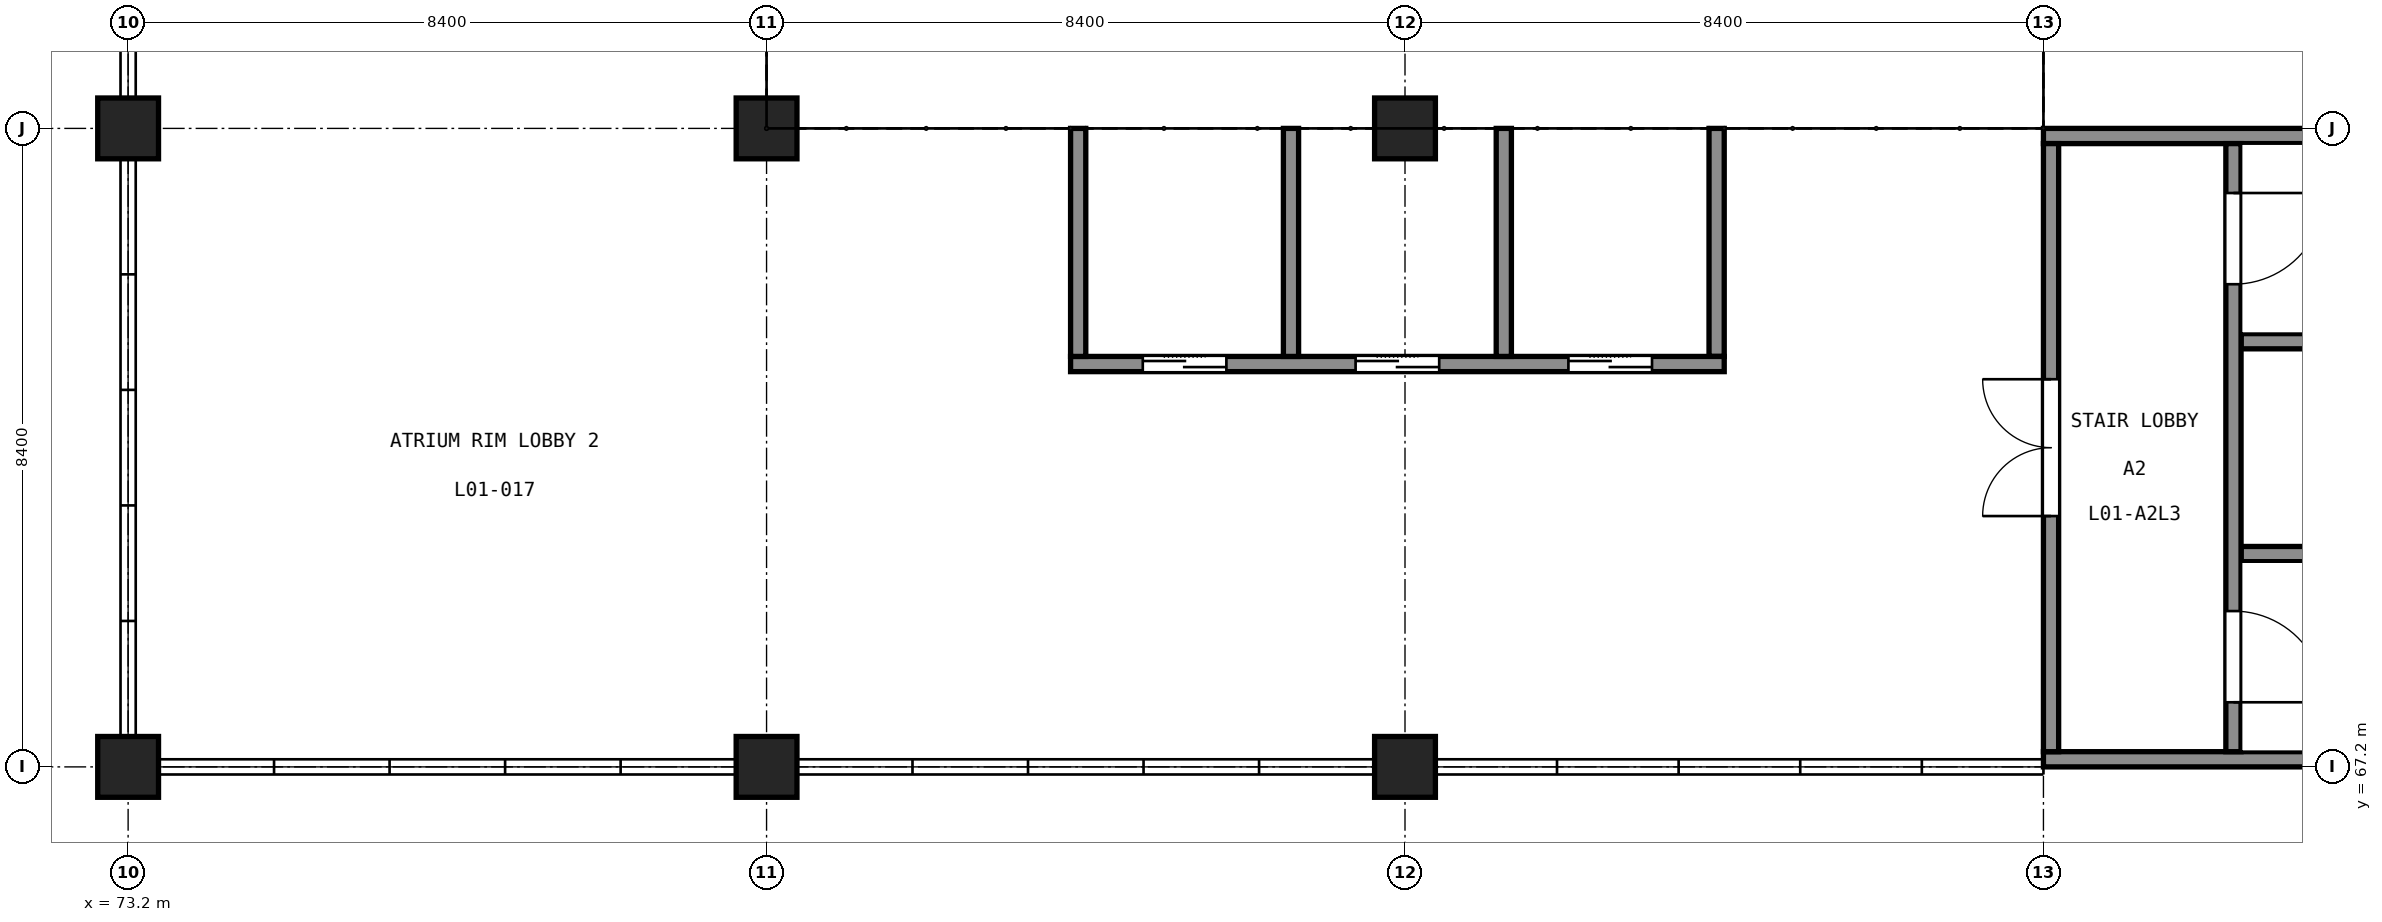
"""IFC4 building model, lengths in metres.
Left out: names, types, materials, properties, quantities, classifications, styles, units other than length and angle.
Written with IfcOpenShell. Run it as: python <this file> out.ifc"""

import sys

from ifc_helpers import new_model, si_unit, direction, frame, frame_2d, origin, origin_2d, place, context, subcontext, project, spatial, rectangle, extrude, element, fill, save


model = new_model("IFC4")
c1 = context("Model", 3, precision=1e-05, world=origin(), true_north=direction((0.0, 1.0)))
c2 = subcontext(c1, "Body", "Model", "MODEL_VIEW")
j1 = project(units=[si_unit("LENGTHUNIT", "METRE"), si_unit("PLANEANGLEUNIT", "RADIAN")], contexts=[c1])
p1 = place(None, origin())
s1 = spatial("IfcSite", under=j1, at=p1, CompositionType="ELEMENT")
p2 = place(p1, origin())
s2 = spatial("IfcBuilding", under=s1, at=p2, CompositionType="ELEMENT")
p3 = place(p2, frame((0.0, 0.0, 5.5)))
s3 = spatial("IfcBuildingStorey", under=s2, at=p3, CompositionType="ELEMENT", Elevation=5.5)
for number, where, z_axis, x_axis in (
    (1, (98.4, 67.3, 0.0), (0.0, 0.0, 1.0), (1.0, 0.0, 0.0)),
    (2, (98.4, 75.5, 0.0), (0.0, 0.0, 1.0), (1.0, 0.0, 0.0)),
):
    element("IfcWall", number, at=place(p3, frame(where, z_axis=z_axis, x_axis=x_axis)), inside=s3, PredefinedType="SHEAR", context=c2, shape_type="SweptSolid", body=[
        extrude(rectangle(XDim=8.4, YDim=0.2, at=frame_2d((4.2, 0.0))), origin(), (0.0, 0.0, 1.0), 5.0),
    ])
p4 = place(p3, frame((98.5, 67.4, 0.0), z_axis=(0.0, 0.0, 1.0), x_axis=(0.0, 1.0, 0.0)))
e3 = element("IfcWall", 3, at=p4, inside=s3, PredefinedType="SHEAR", context=c2, shape_type="SweptSolid", body=[
    extrude(rectangle(XDim=8.0, YDim=0.2, at=frame_2d((4.0, 0.0))), origin(), (0.0, 0.0, 1.0), 5.0),
])
p5 = place(p4, frame((3.1, 0.0, 0.0)))
e4 = element("IfcOpeningElement", 4, at=p5, cuts=e3, PredefinedType="OPENING", context=c2, shape_type="SweptSolid", body=[
    extrude(rectangle(XDim=1.8, YDim=2.1, at=frame_2d((0.9, 1.05))), frame((0.0, 0.11, 0.0), z_axis=(0.0, -1.0, 0.0), x_axis=(1.0, 0.0, 0.0)), (0.0, 0.0, 1.0), 0.22),
])
p6 = place(p3, frame((100.9, 67.4, 0.0), z_axis=(0.0, 0.0, 1.0), x_axis=(0.0, 1.0, 0.0)))
e5 = element("IfcWall", 5, at=p6, inside=s3, PredefinedType="SHEAR", context=c2, shape_type="SweptSolid", body=[
    extrude(rectangle(XDim=8.0, YDim=0.2, at=frame_2d((4.0, 0.0))), origin(), (0.0, 0.0, 1.0), 5.0),
])
p7 = place(p6, frame((0.65, 0.0, 0.0)))
e6 = element("IfcOpeningElement", 6, at=p7, cuts=e5, PredefinedType="OPENING", context=c2, shape_type="SweptSolid", body=[
    extrude(rectangle(XDim=1.2, YDim=2.1, at=frame_2d((0.6, 1.05))), frame((0.0, 0.11, 0.0), z_axis=(0.0, -1.0, 0.0), x_axis=(1.0, 0.0, 0.0)), (0.0, 0.0, 1.0), 0.22),
])
p8 = place(p6, frame((6.15, 0.0, 0.0)))
e7 = element("IfcOpeningElement", 7, at=p8, cuts=e5, PredefinedType="OPENING", context=c2, shape_type="SweptSolid", body=[
    extrude(rectangle(XDim=1.2, YDim=2.1, at=frame_2d((0.6, 1.05))), frame((0.0, 0.11, 0.0), z_axis=(0.0, -1.0, 0.0), x_axis=(1.0, 0.0, 0.0)), (0.0, 0.0, 1.0), 0.22),
])
for number, where, z_axis, x_axis in (
    (8, (101.0, 70.0, 0.0), (0.0, 0.0, 1.0), (1.0, 0.0, 0.0)),
    (9, (101.0, 72.8, 0.0), (0.0, 0.0, 1.0), (1.0, 0.0, 0.0)),
):
    element("IfcWall", number, at=place(p3, frame(where, z_axis=z_axis, x_axis=x_axis)), inside=s3, PredefinedType="SHEAR", context=c2, shape_type="SweptSolid", body=[
        extrude(rectangle(XDim=5.6, YDim=0.2, at=frame_2d((2.8, 0.0))), origin(), (0.0, 0.0, 1.0), 5.0),
    ])
p9 = place(p3, frame((85.6, 72.5, 0.0), z_axis=(0.0, 0.0, 1.0), x_axis=(1.0, 0.0, 0.0)))
e10 = element("IfcWall", 10, at=p9, inside=s3, PredefinedType="SHEAR", context=c2, shape_type="SweptSolid", body=[
    extrude(rectangle(XDim=8.6, YDim=0.2, at=frame_2d((4.3, 0.0))), origin(), (0.0, 0.0, 1.0), 5.0),
])
p10 = place(p9, frame((0.95, 0.0, 0.0)))
e11 = element("IfcOpeningElement", 11, at=p10, cuts=e10, PredefinedType="OPENING", context=c2, shape_type="SweptSolid", body=[
    extrude(rectangle(XDim=1.1, YDim=2.1, at=frame_2d((0.55, 1.05))), frame((0.0, 0.11, 0.0), z_axis=(0.0, -1.0, 0.0), x_axis=(1.0, 0.0, 0.0)), (0.0, 0.0, 1.0), 0.22),
])
p11 = place(p9, frame((3.75, 0.0, 0.0)))
e12 = element("IfcOpeningElement", 12, at=p11, cuts=e10, PredefinedType="OPENING", context=c2, shape_type="SweptSolid", body=[
    extrude(rectangle(XDim=1.1, YDim=2.1, at=frame_2d((0.55, 1.05))), frame((0.0, 0.11, 0.0), z_axis=(0.0, -1.0, 0.0), x_axis=(1.0, 0.0, 0.0)), (0.0, 0.0, 1.0), 0.22),
])
p12 = place(p9, frame((6.55, 0.0, 0.0)))
e13 = element("IfcOpeningElement", 13, at=p12, cuts=e10, PredefinedType="OPENING", context=c2, shape_type="SweptSolid", body=[
    extrude(rectangle(XDim=1.1, YDim=2.1, at=frame_2d((0.55, 1.05))), frame((0.0, 0.11, 0.0), z_axis=(0.0, -1.0, 0.0), x_axis=(1.0, 0.0, 0.0)), (0.0, 0.0, 1.0), 0.22),
])
for number, where, z_axis, x_axis in (
    (14, (85.7, 72.6, 0.0), (0.0, 0.0, 1.0), (0.0, 1.0, 0.0)),
    (15, (94.1, 72.6, 0.0), (0.0, 0.0, 1.0), (0.0, 1.0, 0.0)),
    (16, (88.5, 72.6, 0.0), (0.0, 0.0, 1.0), (0.0, 1.0, 0.0)),
    (17, (91.3, 72.6, 0.0), (0.0, 0.0, 1.0), (0.0, 1.0, 0.0)),
):
    element("IfcWall", number, at=place(p3, frame(where, z_axis=z_axis, x_axis=x_axis)), inside=s3, PredefinedType="SHEAR", context=c2, shape_type="SweptSolid", body=[
        extrude(rectangle(XDim=3.0, YDim=0.2, at=frame_2d((1.5, 0.0))), origin(), (0.0, 0.0, 1.0), 5.0),
    ])
for number, where, z_axis, x_axis in (
    (18, (73.2, 67.2, 0.0), (0.0, 0.0, 1.0), (1.0, 0.0, 0.0)),
    (19, (73.2, 75.6, 0.0), (0.0, 0.0, 1.0), (1.0, 0.0, 0.0)),
    (20, (81.6, 67.2, 0.0), (0.0, 0.0, 1.0), (1.0, 0.0, 0.0)),
    (21, (81.6, 75.6, 0.0), (0.0, 0.0, 1.0), (1.0, 0.0, 0.0)),
    (22, (90.0, 67.2, 0.0), (0.0, 0.0, 1.0), (1.0, 0.0, 0.0)),
    (23, (90.0, 75.6, 0.0), (0.0, 0.0, 1.0), (1.0, 0.0, 0.0)),
):
    element("IfcColumn", number, at=place(p3, frame(where, z_axis=z_axis, x_axis=x_axis)), inside=s3, PredefinedType="COLUMN", context=c2, shape_type="SweptSolid", body=[
        extrude(rectangle(XDim=0.8, YDim=0.8, at=origin_2d()), origin(), (0.0, 0.0, 1.0), 5.0),
    ])
p13 = place(p5, origin())
e24 = element("IfcDoor", 24, at=p13, inside=s3, OperationType="DOUBLE_DOOR_SINGLE_SWING", PredefinedType="DOOR", context=c2, shape_type="SweptSolid", body=[
    extrude(rectangle(XDim=1.8, YDim=2.1, at=frame_2d((0.9, 1.05))), frame((0.0, 0.025, 0.0), z_axis=(0.0, -1.0, 0.0), x_axis=(1.0, 0.0, 0.0)), (0.0, 0.0, 1.0), 0.05),
])
fill(e4, e24)
p14 = place(p7, origin())
e25 = element("IfcDoor", 25, at=p14, inside=s3, OperationType="SINGLE_SWING_LEFT", PredefinedType="DOOR", context=c2, shape_type="SweptSolid", body=[
    extrude(rectangle(XDim=1.2, YDim=2.1, at=frame_2d((0.6, 1.05))), frame((0.0, 0.025, 0.0), z_axis=(0.0, -1.0, 0.0), x_axis=(1.0, 0.0, 0.0)), (0.0, 0.0, 1.0), 0.05),
])
fill(e6, e25)
p15 = place(p8, origin())
e26 = element("IfcDoor", 26, at=p15, inside=s3, OperationType="SINGLE_SWING_RIGHT", PredefinedType="DOOR", context=c2, shape_type="SweptSolid", body=[
    extrude(rectangle(XDim=1.2, YDim=2.1, at=frame_2d((0.6, 1.05))), frame((0.0, 0.025, 0.0), z_axis=(0.0, -1.0, 0.0), x_axis=(1.0, 0.0, 0.0)), (0.0, 0.0, 1.0), 0.05),
])
fill(e7, e26)
p16 = place(p10, origin())
e27 = element("IfcDoor", 27, at=p16, inside=s3, OperationType="DOUBLE_DOOR_SLIDING", PredefinedType="DOOR", context=c2, shape_type="SweptSolid", body=[
    extrude(rectangle(XDim=1.1, YDim=2.1, at=frame_2d((0.55, 1.05))), frame((0.0, 0.025, 0.0), z_axis=(0.0, -1.0, 0.0), x_axis=(1.0, 0.0, 0.0)), (0.0, 0.0, 1.0), 0.05),
])
fill(e11, e27)
p17 = place(p11, origin())
e28 = element("IfcDoor", 28, at=p17, inside=s3, OperationType="DOUBLE_DOOR_SLIDING", PredefinedType="DOOR", context=c2, shape_type="SweptSolid", body=[
    extrude(rectangle(XDim=1.1, YDim=2.1, at=frame_2d((0.55, 1.05))), frame((0.0, 0.025, 0.0), z_axis=(0.0, -1.0, 0.0), x_axis=(1.0, 0.0, 0.0)), (0.0, 0.0, 1.0), 0.05),
])
fill(e12, e28)
p18 = place(p12, origin())
e29 = element("IfcDoor", 29, at=p18, inside=s3, OperationType="DOUBLE_DOOR_SLIDING", PredefinedType="DOOR", context=c2, shape_type="SweptSolid", body=[
    extrude(rectangle(XDim=1.1, YDim=2.1, at=frame_2d((0.55, 1.05))), frame((0.0, 0.025, 0.0), z_axis=(0.0, -1.0, 0.0), x_axis=(1.0, 0.0, 0.0)), (0.0, 0.0, 1.0), 0.05),
])
fill(e13, e29)
save(model, sys.argv[1])
